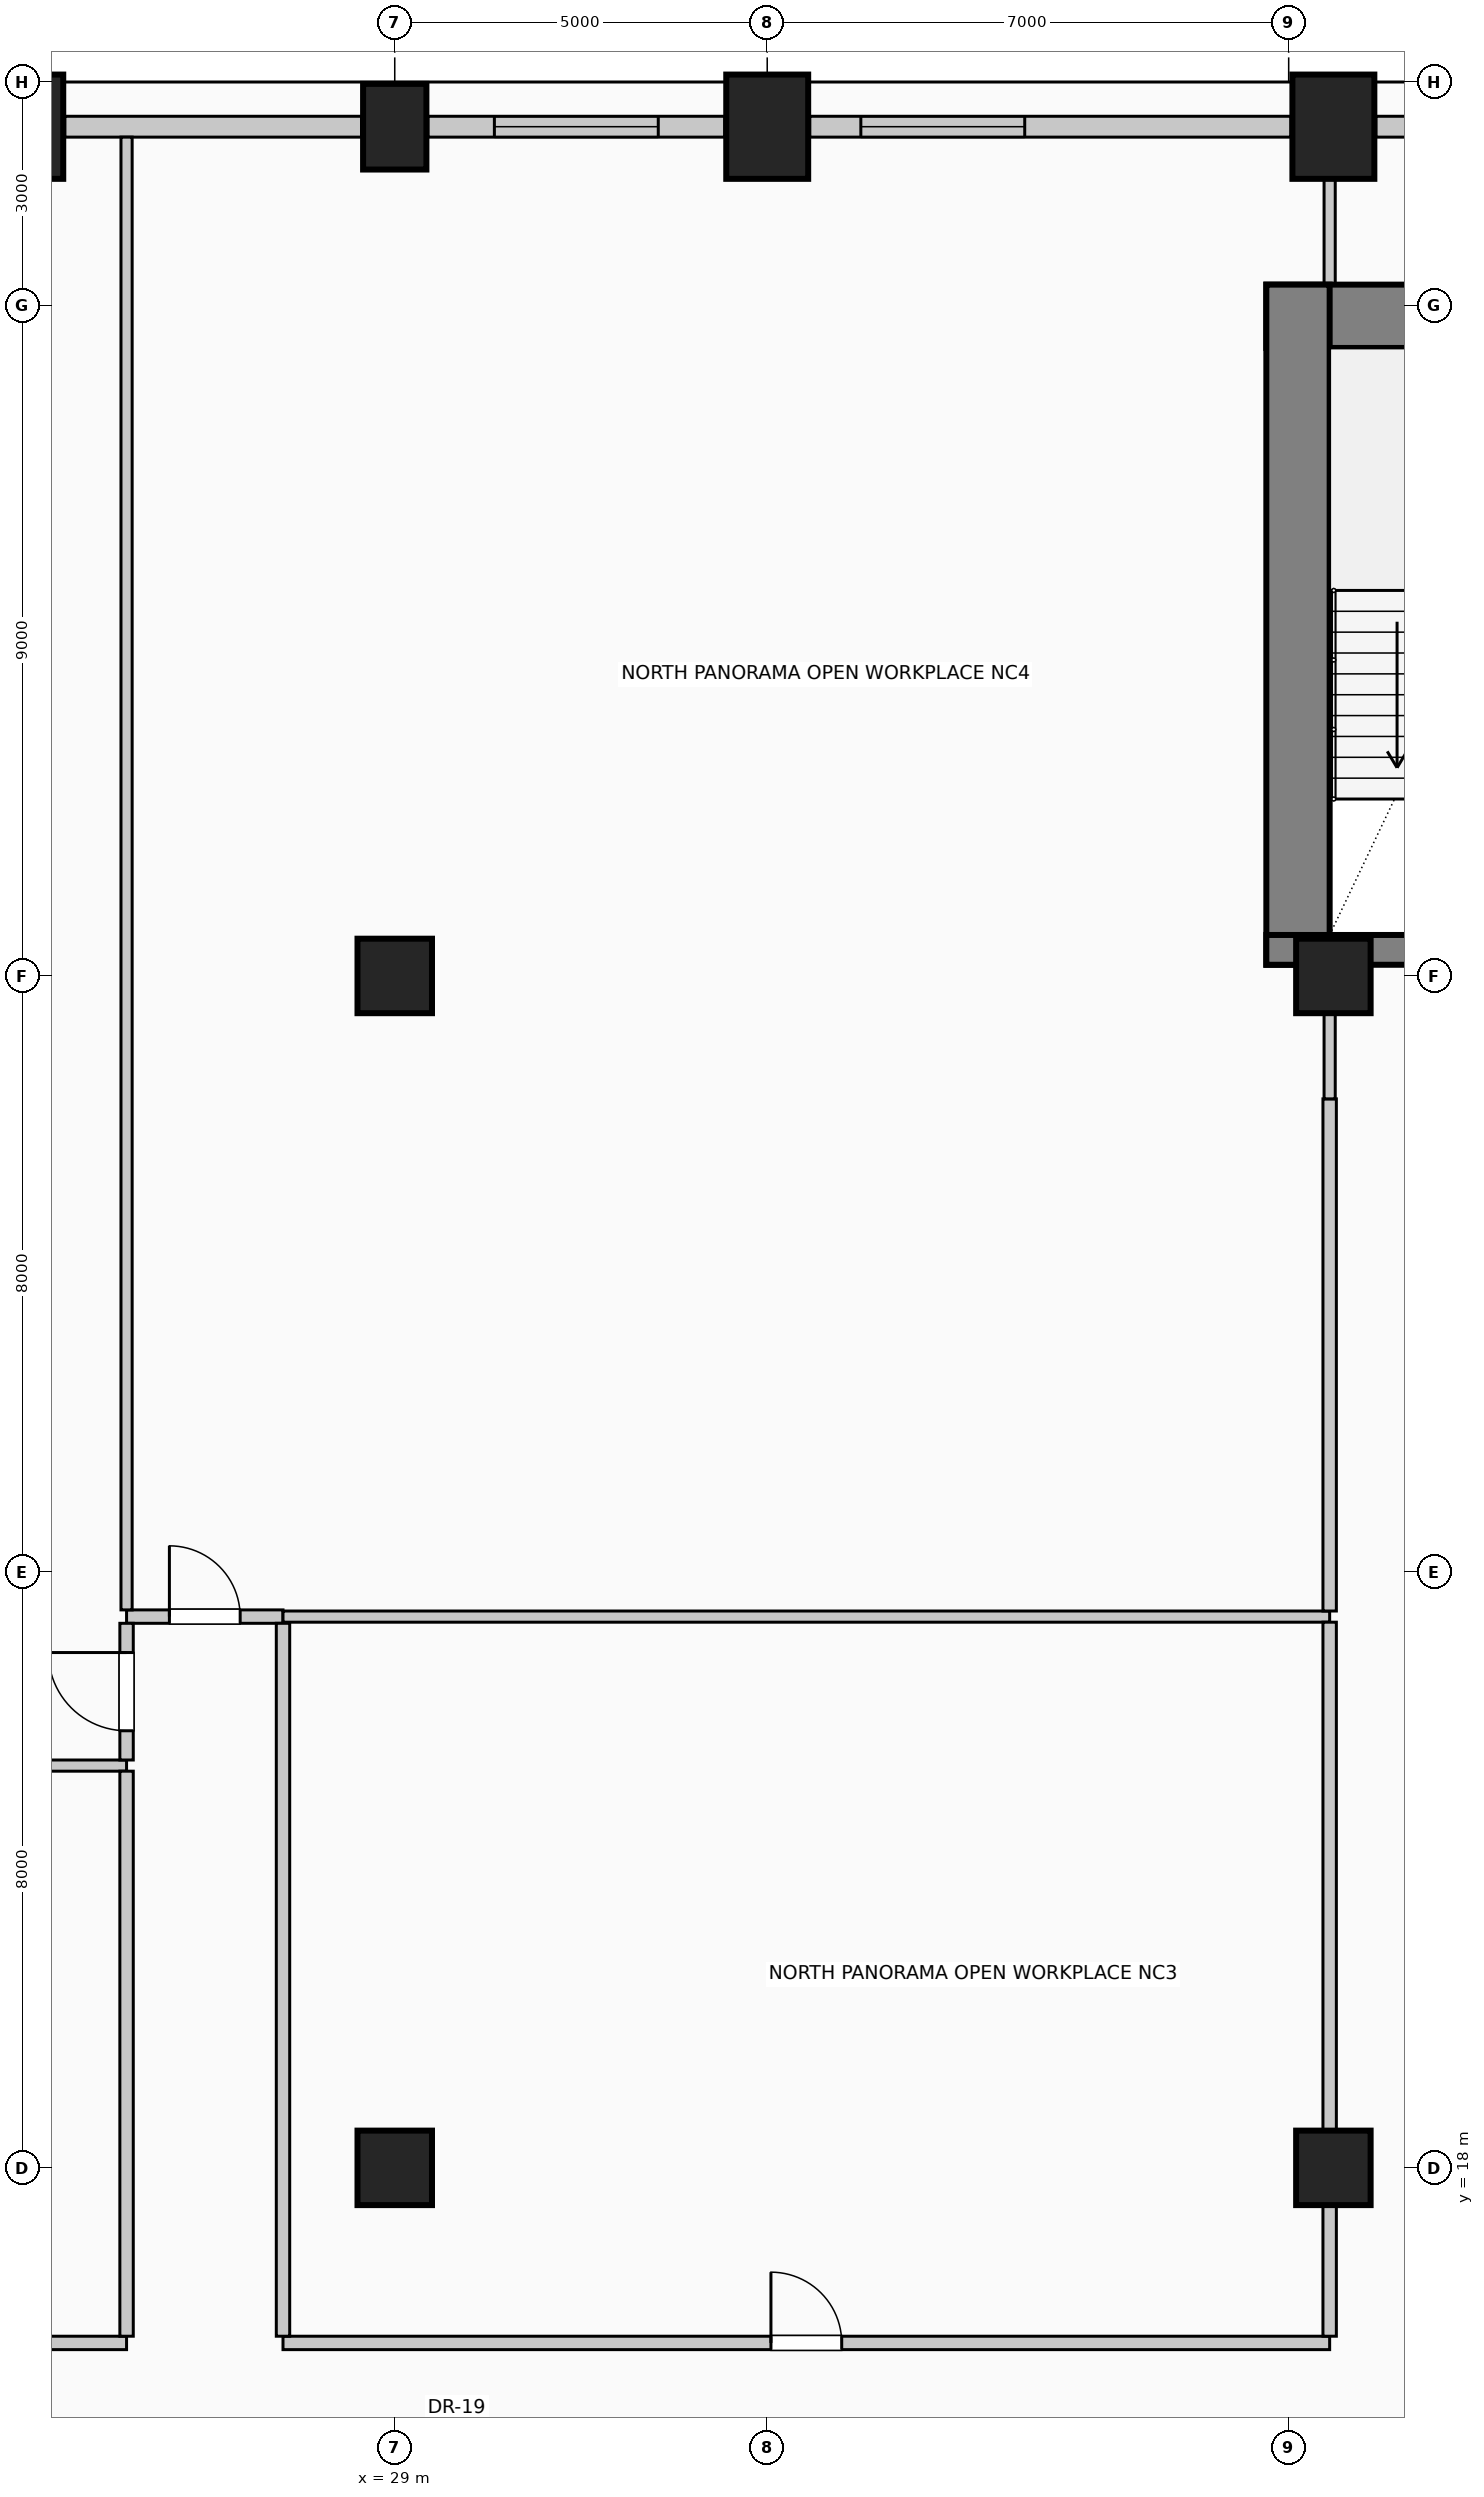
"""IFC4 building model, lengths in metres.
Left out: names, types, materials, properties, quantities, classifications, styles, units other than length and angle.
Written with IfcOpenShell. Run it as: python <this file> out.ifc"""

import sys

from ifc_helpers import new_model, si_unit, direction, frame, frame_2d, origin, origin_2d, place, context, subcontext, project, spatial, rectangle, circle, extrude, element, fill, save


model = new_model("IFC4")
c1 = context("Model", 3, precision=1e-05, world=origin(), true_north=direction((0.0, 1.0)))
c2 = subcontext(c1, "Body", "Model", "MODEL_VIEW")
j1 = project(units=[si_unit("LENGTHUNIT", "METRE"), si_unit("PLANEANGLEUNIT", "RADIAN")], contexts=[c1])
p1 = place(None, origin())
s1 = spatial("IfcSite", under=j1, at=p1, CompositionType="ELEMENT")
p2 = place(p1, origin())
s2 = spatial("IfcBuilding", under=s1, at=p2, CompositionType="ELEMENT")
p3 = place(p2, frame((0.0, 0.0, 116.6)))
s3 = spatial("IfcBuildingStorey", under=s2, at=p3, CompositionType="ELEMENT", Elevation=116.6)
p4 = place(p3, frame((40.7, 42.855, 0.0), z_axis=(0.0, 0.0, 1.0), x_axis=(1.0, 0.0, 0.0)))
e1 = element("IfcWall", 1, at=p4, inside=s3, PredefinedType="SHEAR", context=c2, shape_type="SweptSolid", body=[
    extrude(rectangle(XDim=14.6, YDim=0.85, at=frame_2d((7.3, 0.0))), origin(), (0.0, 0.0, 1.0), 4.0),
])
p5 = place(p3, frame((41.125, 34.15, 0.0), z_axis=(0.0, 0.0, 1.0), x_axis=(0.0, 1.0, 0.0)))
e2 = element("IfcWall", 2, at=p5, inside=s3, PredefinedType="SHEAR", context=c2, shape_type="SweptSolid", body=[
    extrude(rectangle(XDim=9.13, YDim=0.85, at=frame_2d((4.565, 0.0))), origin(), (0.0, 0.0, 1.0), 4.0),
])
p6 = place(p3, frame((40.7, 34.35, 0.0), z_axis=(0.0, 0.0, 1.0), x_axis=(1.0, 0.0, 0.0)))
e3 = element("IfcWall", 3, at=p6, inside=s3, PredefinedType="SHEAR", context=c2, shape_type="SweptSolid", body=[
    extrude(rectangle(XDim=5.01, YDim=0.4, at=frame_2d((2.505, 0.0))), origin(), (0.0, 0.0, 1.0), 4.0),
])
p7 = place(p6, frame((2.4, 0.0, 0.0)))
e4 = element("IfcOpeningElement", 4, at=p7, cuts=e3, PredefinedType="OPENING", context=c2, shape_type="SweptSolid", body=[
    extrude(rectangle(XDim=1.15, YDim=2.2, at=frame_2d((0.575, 1.1))), frame((0.0, 0.21, 0.0), z_axis=(0.0, -1.0, 0.0), x_axis=(1.0, 0.0, 0.0)), (0.0, 0.0, 1.0), 0.42),
])
p8 = place(p3, frame((24.0, 45.4, 0.0), z_axis=(0.0, 0.0, 1.0), x_axis=(1.0, 0.0, 0.0)))
e5 = element("IfcColumn", 5, at=p8, inside=s3, PredefinedType="COLUMN", context=c2, shape_type="SweptSolid", body=[
    extrude(rectangle(XDim=1.1, YDim=1.4, at=origin_2d()), origin(), (0.0, 0.0, 1.0), 4.0),
])
p9 = place(p3, frame((29.0, 45.4, 0.0), z_axis=(0.0, 0.0, 1.0), x_axis=(1.0, 0.0, 0.0)))
e6 = element("IfcColumn", 6, at=p9, inside=s3, PredefinedType="COLUMN", context=c2, shape_type="SweptSolid", body=[
    extrude(rectangle(XDim=0.85, YDim=1.15, at=origin_2d()), origin(), (0.0, 0.0, 1.0), 4.0),
])
for number, where, z_axis, x_axis in (
    (7, (34.0, 45.4, 0.0), (0.0, 0.0, 1.0), (1.0, 0.0, 0.0)),
    (8, (41.6, 45.4, 0.0), (0.0, 0.0, 1.0), (1.0, 0.0, 0.0)),
):
    element("IfcColumn", number, at=place(p3, frame(where, z_axis=z_axis, x_axis=x_axis)), inside=s3, PredefinedType="COLUMN", context=c2, shape_type="SweptSolid", body=[
        extrude(rectangle(XDim=1.1, YDim=1.4, at=origin_2d()), origin(), (0.0, 0.0, 1.0), 4.0),
    ])
for number, where, z_axis, x_axis in (
    (9, (29.0, 18.0, 0.0), (0.0, 0.0, 1.0), (1.0, 0.0, 0.0)),
    (10, (29.0, 34.0, 0.0), (0.0, 0.0, 1.0), (1.0, 0.0, 0.0)),
    (11, (41.6, 18.0, 0.0), (0.0, 0.0, 1.0), (1.0, 0.0, 0.0)),
    (12, (41.6, 34.0, 0.0), (0.0, 0.0, 1.0), (1.0, 0.0, 0.0)),
):
    element("IfcColumn", number, at=place(p3, frame(where, z_axis=z_axis, x_axis=x_axis)), inside=s3, PredefinedType="COLUMN", context=c2, shape_type="SweptSolid", body=[
        extrude(circle(Radius=0.5, at=origin_2d()), origin(), (0.0, 0.0, 1.0), 4.0),
    ])
p10 = place(p3, frame((24.57, 45.4, 0.0), z_axis=(0.0, 0.0, 1.0), x_axis=(1.0, 0.0, 0.0)))
e13 = element("IfcWall", 13, at=p10, inside=s3, PredefinedType="SOLIDWALL", context=c2, shape_type="SweptSolid", body=[
    extrude(rectangle(XDim=3.985, YDim=0.28, at=frame_2d((1.992, 0.0))), origin(), (0.0, 0.0, 1.0), 2.875),
])
p11 = place(p3, frame((29.445, 45.4, 0.0), z_axis=(0.0, 0.0, 1.0), x_axis=(1.0, 0.0, 0.0)))
e14 = element("IfcWall", 14, at=p11, inside=s3, PredefinedType="SOLIDWALL", context=c2, shape_type="SweptSolid", body=[
    extrude(rectangle(XDim=3.985, YDim=0.28, at=frame_2d((1.992, 0.0))), origin(), (0.0, 0.0, 1.0), 2.875),
])
p12 = place(p11, frame((0.893, 0.0, 0.5)))
e15 = element("IfcOpeningElement", 15, at=p12, cuts=e14, PredefinedType="OPENING", context=c2, shape_type="SweptSolid", body=[
    extrude(rectangle(XDim=2.2, YDim=1.95, at=frame_2d((1.1, 0.975))), frame((0.0, 0.15, 0.0), z_axis=(0.0, -1.0, 0.0), x_axis=(1.0, 0.0, 0.0)), (0.0, 0.0, 1.0), 0.3),
])
p13 = place(p3, frame((34.57, 45.4, 0.0), z_axis=(0.0, 0.0, 1.0), x_axis=(1.0, 0.0, 0.0)))
e16 = element("IfcWall", 16, at=p13, inside=s3, PredefinedType="SOLIDWALL", context=c2, shape_type="SweptSolid", body=[
    extrude(rectangle(XDim=6.46, YDim=0.28, at=frame_2d((3.23, 0.0))), origin(), (0.0, 0.0, 1.0), 2.875),
])
p14 = place(p13, frame((0.687, 0.0, 0.5)))
e17 = element("IfcOpeningElement", 17, at=p14, cuts=e16, PredefinedType="OPENING", context=c2, shape_type="SweptSolid", body=[
    extrude(rectangle(XDim=2.2, YDim=1.95, at=frame_2d((1.1, 0.975))), frame((0.0, 0.15, 0.0), z_axis=(0.0, -1.0, 0.0), x_axis=(1.0, 0.0, 0.0)), (0.0, 0.0, 1.0), 0.3),
])
p15 = place(p3, frame((42.17, 45.4, 0.0), z_axis=(0.0, 0.0, 1.0), x_axis=(1.0, 0.0, 0.0)))
e18 = element("IfcWall", 18, at=p15, inside=s3, PredefinedType="SOLIDWALL", context=c2, shape_type="SweptSolid", body=[
    extrude(rectangle(XDim=1.385, YDim=0.28, at=frame_2d((0.692, 0.0))), origin(), (0.0, 0.0, 1.0), 2.875),
])
p16 = place(p3, frame((16.65, 15.65, 0.0), z_axis=(0.0, 0.0, 1.0), x_axis=(1.0, 0.0, 0.0)))
e19 = element("IfcWall", 19, at=p16, inside=s3, PredefinedType="PARTITIONING", context=c2, shape_type="SweptSolid", body=[
    extrude(rectangle(XDim=8.75, YDim=0.18, at=frame_2d((4.375, 0.0))), origin(), (0.0, 0.0, 1.0), 3.725),
])
p17 = place(p16, frame((3.85, 0.0, 0.0)))
e20 = element("IfcOpeningElement", 20, at=p17, cuts=e19, PredefinedType="OPENING", context=c2, shape_type="SweptSolid", body=[
    extrude(rectangle(XDim=1.05, YDim=2.15, at=frame_2d((0.525, 1.075))), frame((0.0, 0.1, 0.0), z_axis=(0.0, -1.0, 0.0), x_axis=(1.0, 0.0, 0.0)), (0.0, 0.0, 1.0), 0.2),
])
p18 = place(p3, frame((27.5, 15.65, 0.0), z_axis=(0.0, 0.0, 1.0), x_axis=(1.0, 0.0, 0.0)))
e21 = element("IfcWall", 21, at=p18, inside=s3, PredefinedType="PARTITIONING", context=c2, shape_type="SweptSolid", body=[
    extrude(rectangle(XDim=14.05, YDim=0.18, at=frame_2d((7.025, 0.0))), origin(), (0.0, 0.0, 1.0), 3.725),
])
p19 = place(p18, frame((6.55, 0.0, 0.0)))
e22 = element("IfcOpeningElement", 22, at=p19, cuts=e21, PredefinedType="OPENING", context=c2, shape_type="SweptSolid", body=[
    extrude(rectangle(XDim=0.95, YDim=2.15, at=frame_2d((0.475, 1.075))), frame((0.0, 0.1, 0.0), z_axis=(0.0, -1.0, 0.0), x_axis=(1.0, 0.0, 0.0)), (0.0, 0.0, 1.0), 0.2),
])
p20 = place(p3, frame((16.65, 23.4, 0.0), z_axis=(0.0, 0.0, 1.0), x_axis=(1.0, 0.0, 0.0)))
e23 = element("IfcWall", 23, at=p20, inside=s3, PredefinedType="PARTITIONING", context=c2, shape_type="SweptSolid", body=[
    extrude(rectangle(XDim=8.75, YDim=0.15, at=frame_2d((4.375, 0.0))), origin(), (0.0, 0.0, 1.0), 3.725),
])
p21 = place(p3, frame((25.4, 25.4, 0.0), z_axis=(0.0, 0.0, 1.0), x_axis=(1.0, 0.0, 0.0)))
e24 = element("IfcWall", 24, at=p21, inside=s3, PredefinedType="PARTITIONING", context=c2, shape_type="SweptSolid", body=[
    extrude(rectangle(XDim=2.1, YDim=0.18, at=frame_2d((1.05, 0.0))), origin(), (0.0, 0.0, 1.0), 3.17),
])
p22 = place(p21, frame((0.575, 0.0, 0.0)))
e25 = element("IfcOpeningElement", 25, at=p22, cuts=e24, PredefinedType="OPENING", context=c2, shape_type="SweptSolid", body=[
    extrude(rectangle(XDim=0.95, YDim=2.15, at=frame_2d((0.475, 1.075))), frame((0.0, 0.1, 0.0), z_axis=(0.0, -1.0, 0.0), x_axis=(1.0, 0.0, 0.0)), (0.0, 0.0, 1.0), 0.2),
])
p23 = place(p3, frame((27.5, 25.4, 0.0), z_axis=(0.0, 0.0, 1.0), x_axis=(1.0, 0.0, 0.0)))
e26 = element("IfcWall", 26, at=p23, inside=s3, PredefinedType="PARTITIONING", context=c2, shape_type="SweptSolid", body=[
    extrude(rectangle(XDim=14.05, YDim=0.15, at=frame_2d((7.025, 0.0))), origin(), (0.0, 0.0, 1.0), 3.17),
])
p24 = place(p3, frame((25.4, 15.74, 0.0), z_axis=(0.0, 0.0, 1.0), x_axis=(0.0, 1.0, 0.0)))
e27 = element("IfcWall", 27, at=p24, inside=s3, PredefinedType="PARTITIONING", context=c2, shape_type="SweptSolid", body=[
    extrude(rectangle(XDim=7.585, YDim=0.18, at=frame_2d((3.792, 0.0))), origin(), (0.0, 0.0, 1.0), 3.725),
])
p25 = place(p3, frame((25.4, 23.475, 0.0), z_axis=(0.0, 0.0, 1.0), x_axis=(0.0, 1.0, 0.0)))
e28 = element("IfcWall", 28, at=p25, inside=s3, PredefinedType="PARTITIONING", context=c2, shape_type="SweptSolid", body=[
    extrude(rectangle(XDim=1.835, YDim=0.18, at=frame_2d((0.917, 0.0))), origin(), (0.0, 0.0, 1.0), 3.725),
])
p26 = place(p25, frame((0.393, 0.0, 0.0)))
e29 = element("IfcOpeningElement", 29, at=p26, cuts=e28, PredefinedType="OPENING", context=c2, shape_type="SweptSolid", body=[
    extrude(rectangle(XDim=1.05, YDim=2.15, at=frame_2d((0.525, 1.075))), frame((0.0, 0.1, 0.0), z_axis=(0.0, -1.0, 0.0), x_axis=(1.0, 0.0, 0.0)), (0.0, 0.0, 1.0), 0.2),
])
p27 = place(p3, frame((25.4, 25.49, 0.0), z_axis=(0.0, 0.0, 1.0), x_axis=(0.0, 1.0, 0.0)))
e30 = element("IfcWall", 30, at=p27, inside=s3, PredefinedType="PARTITIONING", context=c2, shape_type="SweptSolid", body=[
    extrude(rectangle(XDim=19.77, YDim=0.15, at=frame_2d((9.885, 0.0))), origin(), (0.0, 0.0, 1.0), 3.725),
])
p28 = place(p3, frame((27.5, 15.74, 0.0), z_axis=(0.0, 0.0, 1.0), x_axis=(0.0, 1.0, 0.0)))
e31 = element("IfcWall", 31, at=p28, inside=s3, PredefinedType="PARTITIONING", context=c2, shape_type="SweptSolid", body=[
    extrude(rectangle(XDim=9.57, YDim=0.18, at=frame_2d((4.785, 0.0))), origin(), (0.0, 0.0, 1.0), 3.725),
])
p29 = place(p3, frame((41.55, 15.74, 0.0), z_axis=(0.0, 0.0, 1.0), x_axis=(0.0, 1.0, 0.0)))
e32 = element("IfcWall", 32, at=p29, inside=s3, PredefinedType="PARTITIONING", context=c2, shape_type="SweptSolid", body=[
    extrude(rectangle(XDim=1.76, YDim=0.18, at=frame_2d((0.88, 0.0))), origin(), (0.0, 0.0, 1.0), 3.07),
])
p30 = place(p3, frame((41.55, 18.5, 0.0), z_axis=(0.0, 0.0, 1.0), x_axis=(0.0, 1.0, 0.0)))
e33 = element("IfcWall", 33, at=p30, inside=s3, PredefinedType="PARTITIONING", context=c2, shape_type="SweptSolid", body=[
    extrude(rectangle(XDim=6.825, YDim=0.18, at=frame_2d((3.413, 0.0))), origin(), (0.0, 0.0, 1.0), 3.07),
])
p31 = place(p3, frame((41.55, 25.475, 0.0), z_axis=(0.0, 0.0, 1.0), x_axis=(0.0, 1.0, 0.0)))
e34 = element("IfcWall", 34, at=p31, inside=s3, PredefinedType="PARTITIONING", context=c2, shape_type="SweptSolid", body=[
    extrude(rectangle(XDim=6.875, YDim=0.18, at=frame_2d((3.438, 0.0))), origin(), (0.0, 0.0, 1.0), 3.07),
])
p32 = place(p3, frame((41.55, 32.35, 0.0), z_axis=(0.0, 0.0, 1.0), x_axis=(0.0, 1.0, 0.0)))
e35 = element("IfcWall", 35, at=p32, inside=s3, PredefinedType="PARTITIONING", context=c2, shape_type="SweptSolid", body=[
    extrude(rectangle(XDim=1.15, YDim=0.15, at=frame_2d((0.575, 0.0))), origin(), (0.0, 0.0, 1.0), 3.07),
])
p33 = place(p3, frame((41.55, 43.28, 0.0), z_axis=(0.0, 0.0, 1.0), x_axis=(0.0, 1.0, 0.0)))
e36 = element("IfcWall", 36, at=p33, inside=s3, PredefinedType="PARTITIONING", context=c2, shape_type="SweptSolid", body=[
    extrude(rectangle(XDim=1.42, YDim=0.15, at=frame_2d((0.71, 0.0))), origin(), (0.0, 0.0, 1.0), 3.725),
])
p34 = place(p12, origin())
e37 = element("IfcWindow", 37, at=p34, inside=s3, PartitioningType="SINGLE_PANEL", PredefinedType="WINDOW", context=c2, shape_type="SweptSolid", body=[
    extrude(rectangle(XDim=2.2, YDim=1.95, at=frame_2d((1.1, 0.975))), frame((0.0, 0.03, 0.0), z_axis=(0.0, -1.0, 0.0), x_axis=(1.0, 0.0, 0.0)), (0.0, 0.0, 1.0), 0.06),
])
fill(e15, e37)
p35 = place(p14, origin())
e38 = element("IfcWindow", 38, at=p35, inside=s3, PartitioningType="SINGLE_PANEL", PredefinedType="WINDOW", context=c2, shape_type="SweptSolid", body=[
    extrude(rectangle(XDim=2.2, YDim=1.95, at=frame_2d((1.1, 0.975))), frame((0.0, 0.03, 0.0), z_axis=(0.0, -1.0, 0.0), x_axis=(1.0, 0.0, 0.0)), (0.0, 0.0, 1.0), 0.06),
])
fill(e17, e38)
p36 = place(p19, origin())
e39 = element("IfcDoor", 39, at=p36, inside=s3, OperationType="SINGLE_SWING_LEFT", PredefinedType="DOOR", context=c2, shape_type="SweptSolid", body=[
    extrude(rectangle(XDim=0.95, YDim=2.15, at=frame_2d((0.475, 1.075))), frame((0.0, 0.025, 0.0), z_axis=(0.0, -1.0, 0.0), x_axis=(1.0, 0.0, 0.0)), (0.0, 0.0, 1.0), 0.05),
])
fill(e22, e39)
p37 = place(p22, origin())
e40 = element("IfcDoor", 40, at=p37, inside=s3, OperationType="SINGLE_SWING_LEFT", PredefinedType="DOOR", context=c2, shape_type="SweptSolid", body=[
    extrude(rectangle(XDim=0.95, YDim=2.15, at=frame_2d((0.475, 1.075))), frame((0.0, 0.025, 0.0), z_axis=(0.0, -1.0, 0.0), x_axis=(1.0, 0.0, 0.0)), (0.0, 0.0, 1.0), 0.05),
])
fill(e25, e40)
p38 = place(p26, origin())
e41 = element("IfcDoor", 41, at=p38, inside=s3, OperationType="SINGLE_SWING_RIGHT", PredefinedType="DOOR", context=c2, shape_type="SweptSolid", body=[
    extrude(rectangle(XDim=1.05, YDim=2.15, at=frame_2d((0.525, 1.075))), frame((0.0, 0.025, 0.0), z_axis=(0.0, -1.0, 0.0), x_axis=(1.0, 0.0, 0.0)), (0.0, 0.0, 1.0), 0.05),
])
fill(e29, e41)
save(model, sys.argv[1])
